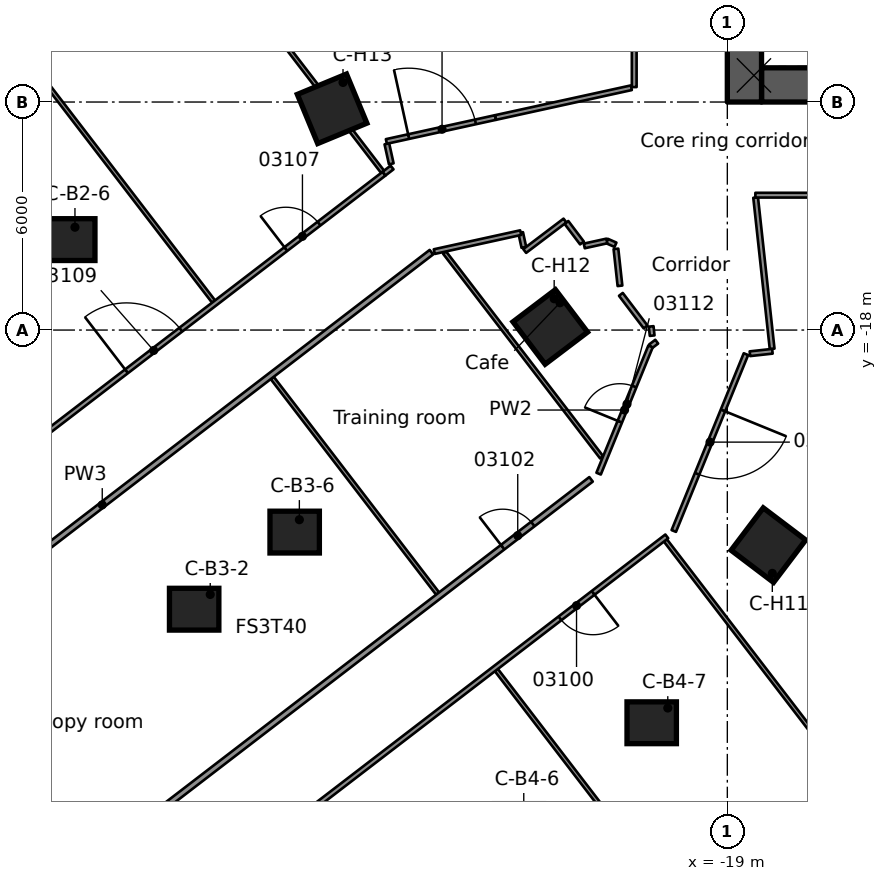
"""IFC4 building model, lengths in metres.
Left out: names, types, materials, properties, quantities, classifications, styles, units other than length and angle.
Written with IfcOpenShell. Run it as: python <this file> out.ifc"""

import sys

from ifc_helpers import new_model, si_unit, direction, frame, frame_2d, origin, origin_2d, place, context, subcontext, project, spatial, rectangle, extrude, element, fill, save


model = new_model("IFC4")
c1 = context("Model", 3, precision=1e-05, world=origin(), true_north=direction((0.0, 1.0)))
c2 = subcontext(c1, "Body", "Model", "MODEL_VIEW")
j1 = project(units=[si_unit("LENGTHUNIT", "METRE"), si_unit("PLANEANGLEUNIT", "RADIAN")], contexts=[c1])
p1 = place(None, origin())
s1 = spatial("IfcSite", under=j1, at=p1, CompositionType="ELEMENT")
p2 = place(p1, origin())
s2 = spatial("IfcBuilding", under=s1, at=p2, CompositionType="ELEMENT")
p3 = place(p2, frame((0.0, 0.0, 15.5)))
s3 = spatial("IfcBuildingStorey", under=s2, at=p3, CompositionType="ELEMENT", Elevation=15.5)
p4 = place(p3, frame((-18.1, -11.55, 0.0), z_axis=(0.0, 0.0, 1.0), x_axis=(1.0, 0.0, 0.0)))
e1 = element("IfcWall", 1, at=p4, inside=s3, PredefinedType="SHEAR", context=c2, shape_type="SweptSolid", body=[
    extrude(rectangle(XDim=9.2, YDim=0.9, at=frame_2d((4.6, 0.0))), origin(), (0.0, 0.0, 1.0), 5.0),
])
p5 = place(p4, frame((5.1, 0.0, 0.0)))
e2 = element("IfcOpeningElement", 2, at=p5, cuts=e1, PredefinedType="OPENING", context=c2, shape_type="SweptSolid", body=[
    extrude(rectangle(XDim=1.1, YDim=2.1, at=frame_2d((0.55, 1.05))), frame((0.0, 0.46, 0.0), z_axis=(0.0, -1.0, 0.0), x_axis=(1.0, 0.0, 0.0)), (0.0, 0.0, 1.0), 0.92),
])
p6 = place(p4, frame((7.53, 0.0, 0.0)))
e3 = element("IfcOpeningElement", 3, at=p6, cuts=e1, PredefinedType="OPENING", context=c2, shape_type="SweptSolid", body=[
    extrude(rectangle(XDim=0.9, YDim=2.1, at=frame_2d((0.45, 1.05))), frame((0.0, 0.46, 0.0), z_axis=(0.0, -1.0, 0.0), x_axis=(1.0, 0.0, 0.0)), (0.0, 0.0, 1.0), 0.92),
])
p7 = place(p3, frame((-18.55, -12.0, 0.0), z_axis=(0.0, 0.0, 1.0), x_axis=(0.0, 1.0, 0.0)))
e4 = element("IfcWall", 4, at=p7, inside=s3, PredefinedType="SHEAR", context=c2, shape_type="SweptSolid", body=[
    extrude(rectangle(XDim=24.0, YDim=0.9, at=frame_2d((12.0, 0.0))), origin(), (0.0, 0.0, 1.0), 5.0),
])
p8 = place(p7, frame((10.1, 0.0, 0.0)))
e5 = element("IfcOpeningElement", 5, at=p8, cuts=e4, PredefinedType="OPENING", context=c2, shape_type="SweptSolid", body=[
    extrude(rectangle(XDim=1.8, YDim=2.1, at=frame_2d((0.9, 1.05))), frame((0.0, 0.46, 0.0), z_axis=(0.0, -1.0, 0.0), x_axis=(1.0, 0.0, 0.0)), (0.0, 0.0, 1.0), 0.92),
])
for number, where, z_axis, x_axis in (
    (6, (-36.29, -15.62, 0.0), (0.0, 0.0, 1.0), (1.0, 0.0, 0.0)),
    (7, (-33.03, -25.345, 0.0), (0.0, 0.0, 1.0), (1.0, 0.0, 0.0)),
    (8, (-30.385, -23.316, 0.0), (0.0, 0.0, 1.0), (1.0, 0.0, 0.0)),
    (9, (-20.99, -28.333, 0.0), (0.0, 0.0, 1.0), (1.0, 0.0, 0.0)),
):
    element("IfcColumn", number, at=place(p3, frame(where, z_axis=z_axis, x_axis=x_axis)), inside=s3, PredefinedType="COLUMN", context=c2, shape_type="SweptSolid", body=[
        extrude(rectangle(XDim=1.3, YDim=1.1, at=origin_2d()), origin(), (0.0, 0.0, 1.0), 5.0),
    ])
for number, where, z_axis, x_axis in (
    (10, (-17.919, -23.659, 0.0), (0.0, 0.0, 1.0), (-0.604, -0.797, 0.0)),
    (11, (-23.659, -17.919, 0.0), (0.0, 0.0, 1.0), (-0.797, -0.604, 0.0)),
    (12, (-29.4, -12.178, 0.0), (0.0, 0.0, 1.0), (-0.924, -0.383, 0.0)),
):
    element("IfcColumn", number, at=place(p3, frame(where, z_axis=z_axis, x_axis=x_axis)), inside=s3, PredefinedType="COLUMN", context=c2, shape_type="SweptSolid", body=[
        extrude(rectangle(XDim=1.4, YDim=1.4, at=origin_2d()), origin(), (0.0, 0.0, 1.0), 5.0),
    ])
p9 = place(p3, frame((-21.004, -17.904, 0.0), z_axis=(0.0, 0.0, 1.0), x_axis=(0.105933230141, -0.994373245191, 0.0)))
e13 = element("IfcWall", 13, at=p9, inside=s3, PredefinedType="PARTITIONING", context=c2, shape_type="SweptSolid", body=[
    extrude(rectangle(XDim=0.244, YDim=0.125, at=frame_2d((0.122, 0.0))), origin(), (0.0, 0.0, 1.0), 4.58),
])
p10 = place(p3, frame((-21.931, -15.864, 0.0), z_axis=(0.0, 0.0, 1.0), x_axis=(0.10837572028, -0.99411000561, 0.0)))
e14 = element("IfcWall", 14, at=p10, inside=s3, PredefinedType="PARTITIONING", context=c2, shape_type="SweptSolid", body=[
    extrude(rectangle(XDim=0.978, YDim=0.125, at=frame_2d((0.489, 0.0))), origin(), (0.0, 0.0, 1.0), 4.58),
])
p11 = place(p3, frame((-18.255, -14.513, 0.0), z_axis=(0.0, 0.0, 1.0), x_axis=(0.108304050005, -0.994117816334, 0.0)))
e15 = element("IfcWall", 15, at=p11, inside=s3, PredefinedType="PARTITIONING", context=c2, shape_type="SweptSolid", body=[
    extrude(rectangle(XDim=4.006, YDim=0.125, at=frame_2d((2.003, 0.0))), origin(), (0.0, 0.0, 1.0), 4.58),
])
p12 = place(p3, frame((-24.438, -15.437, 0.0), z_axis=(0.0, 0.0, 1.0), x_axis=(0.212096867325, -0.977248647413, 0.0)))
e16 = element("IfcWall", 16, at=p12, inside=s3, PredefinedType="PARTITIONING", context=c2, shape_type="SweptSolid", body=[
    extrude(rectangle(XDim=0.396, YDim=0.125, at=frame_2d((0.198, 0.0))), origin(), (0.0, 0.0, 1.0), 4.58),
])
p13 = place(p3, frame((-27.959, -13.1, 0.0), z_axis=(0.0, 0.0, 1.0), x_axis=(0.215346078447, -0.976537795734, 0.0)))
e17 = element("IfcWall", 17, at=p13, inside=s3, PredefinedType="PARTITIONING", context=c2, shape_type="SweptSolid", body=[
    extrude(rectangle(XDim=0.539, YDim=0.125, at=frame_2d((0.269, 0.0))), origin(), (0.0, 0.0, 1.0), 4.58),
])
p14 = place(p3, frame((-23.234, -15.168, 0.0), z_axis=(0.0, 0.0, 1.0), x_axis=(0.602990949897, -0.797748026849, 0.0)))
e18 = element("IfcWall", 18, at=p14, inside=s3, PredefinedType="PARTITIONING", context=c2, shape_type="SweptSolid", body=[
    extrude(rectangle(XDim=0.678, YDim=0.125, at=frame_2d((0.339, 0.0))), origin(), (0.0, 0.0, 1.0), 4.58),
])
p15 = place(p3, frame((-21.801, -17.061, 0.0), z_axis=(0.0, 0.0, 1.0), x_axis=(0.604123687543, -0.796890563471, 0.0)))
e19 = element("IfcWall", 19, at=p15, inside=s3, PredefinedType="PARTITIONING", context=c2, shape_type="SweptSolid", body=[
    extrude(rectangle(XDim=1.078, YDim=0.125, at=frame_2d((0.539, 0.0))), origin(), (0.0, 0.0, 1.0), 4.58),
])
p16 = place(p3, frame((-41.126, -6.033, 0.0), z_axis=(0.0, 0.0, 1.0), x_axis=(0.608775561638, -0.793342495743, 0.0)))
e20 = element("IfcWall", 20, at=p16, inside=s3, PredefinedType="PARTITIONING", context=c2, shape_type="SweptSolid", body=[
    extrude(rectangle(XDim=14.136, YDim=0.1, at=frame_2d((7.068, 0.0))), origin(), (0.0, 0.0, 1.0), 4.58),
])
p17 = place(p3, frame((-30.975, -19.261, 0.0), z_axis=(0.0, 0.0, 1.0), x_axis=(0.608667353297, -0.793425518263, 0.0)))
e21 = element("IfcWall", 21, at=p17, inside=s3, PredefinedType="PARTITIONING", context=c2, shape_type="SweptSolid", body=[
    extrude(rectangle(XDim=7.15, YDim=0.1, at=frame_2d((3.575, 0.0))), origin(), (0.0, 0.0, 1.0), 4.58),
])
p18 = place(p3, frame((-25.077, -26.948, 0.0), z_axis=(0.0, 0.0, 1.0), x_axis=(0.60874219909, -0.793368095557, 0.0)))
e22 = element("IfcWall", 22, at=p18, inside=s3, PredefinedType="PARTITIONING", context=c2, shape_type="SweptSolid", body=[
    extrude(rectangle(XDim=14.137, YDim=0.1, at=frame_2d((7.069, 0.0))), origin(), (0.0, 0.0, 1.0), 4.58),
])
p19 = place(p3, frame((-36.678, -2.62, 0.0), z_axis=(0.0, 0.0, 1.0), x_axis=(0.608783902678, -0.793336095132, 0.0)))
e23 = element("IfcWall", 23, at=p19, inside=s3, PredefinedType="PARTITIONING", context=c2, shape_type="SweptSolid", body=[
    extrude(rectangle(XDim=14.136, YDim=0.1, at=frame_2d((7.068, 0.0))), origin(), (0.0, 0.0, 1.0), 4.58),
])
p20 = place(p3, frame((-26.44, -15.962, 0.0), z_axis=(0.0, 0.0, 1.0), x_axis=(0.608697215762, -0.79340260872, 0.0)))
e24 = element("IfcWall", 24, at=p20, inside=s3, PredefinedType="PARTITIONING", context=c2, shape_type="SweptSolid", body=[
    extrude(rectangle(XDim=6.79, YDim=0.1, at=frame_2d((3.395, 0.0))), origin(), (0.0, 0.0, 1.0), 4.58),
])
p21 = place(p3, frame((-20.63, -23.535, 0.0), z_axis=(0.0, 0.0, 1.0), x_axis=(0.608785675767, -0.79333473451, 0.0)))
e25 = element("IfcWall", 25, at=p21, inside=s3, PredefinedType="PARTITIONING", context=c2, shape_type="SweptSolid", body=[
    extrude(rectangle(XDim=14.138, YDim=0.1, at=frame_2d((7.069, 0.0))), origin(), (0.0, 0.0, 1.0), 4.58),
])
p22 = place(p3, frame((-22.17, -15.656, 0.0), z_axis=(0.0, 0.0, 1.0), x_axis=(0.914864311429, -0.403761429156, 0.0)))
e26 = element("IfcWall", 26, at=p22, inside=s3, PredefinedType="PARTITIONING", context=c2, shape_type="SweptSolid", body=[
    extrude(rectangle(XDim=0.248, YDim=0.125, at=frame_2d((0.124, 0.0))), origin(), (0.0, 0.0, 1.0), 4.58),
])
p23 = place(p3, frame((-10.391, -14.451, 0.0), z_axis=(0.0, 0.0, 1.0), x_axis=(-1.0, 0.0, 0.0)))
e27 = element("IfcWall", 27, at=p23, inside=s3, PredefinedType="PARTITIONING", context=c2, shape_type="SweptSolid", body=[
    extrude(rectangle(XDim=7.871, YDim=0.125, at=frame_2d((3.936, 0.0))), origin(), (0.0, 0.0, 1.0), 4.58),
])
p24 = place(p23, frame((3.1, 0.0, 0.0)))
e28 = element("IfcOpeningElement", 28, at=p24, cuts=e27, PredefinedType="OPENING", context=c2, shape_type="SweptSolid", body=[
    extrude(rectangle(XDim=1.8, YDim=2.1, at=frame_2d((0.9, 1.05))), frame((0.0, 0.073, 0.0), z_axis=(0.0, -1.0, 0.0), x_axis=(1.0, 0.0, 0.0)), (0.0, 0.0, 1.0), 0.145),
])
p25 = place(p3, frame((-18.406, -18.623, 0.0), z_axis=(0.0, 0.0, 1.0), x_axis=(0.994037722998, 0.109036715182, 0.0)))
e29 = element("IfcWall", 29, at=p25, inside=s3, PredefinedType="PARTITIONING", context=c2, shape_type="SweptSolid", body=[
    extrude(rectangle(XDim=0.596, YDim=0.125, at=frame_2d((0.298, 0.0))), origin(), (0.0, 0.0, 1.0), 4.58),
])
p26 = place(p3, frame((-26.712, -15.936, 0.0), z_axis=(0.0, 0.0, 1.0), x_axis=(0.976756126143, 0.214353609817, 0.0)))
e30 = element("IfcWall", 30, at=p26, inside=s3, PredefinedType="PARTITIONING", context=c2, shape_type="SweptSolid", body=[
    extrude(rectangle(XDim=2.328, YDim=0.125, at=frame_2d((1.164, 0.0))), origin(), (0.0, 0.0, 1.0), 4.58),
])
p27 = place(p3, frame((-22.765, -15.787, 0.0), z_axis=(0.0, 0.0, 1.0), x_axis=(0.97657209397, 0.215190486033, 0.0)))
e31 = element("IfcWall", 31, at=p27, inside=s3, PredefinedType="PARTITIONING", context=c2, shape_type="SweptSolid", body=[
    extrude(rectangle(XDim=0.609, YDim=0.125, at=frame_2d((0.305, 0.0))), origin(), (0.0, 0.0, 1.0), 4.58),
])
p28 = place(p3, frame((-25.102, -12.408, 0.0), z_axis=(0.0, 0.0, 1.0), x_axis=(0.976805954505, 0.214126428176, 0.0)))
e32 = element("IfcWall", 32, at=p28, inside=s3, PredefinedType="PARTITIONING", context=c2, shape_type="SweptSolid", body=[
    extrude(rectangle(XDim=3.661, YDim=0.125, at=frame_2d((1.831, 0.0))), origin(), (0.0, 0.0, 1.0), 4.58),
])
p29 = place(p3, frame((-27.972, -13.038, 0.0), z_axis=(0.0, 0.0, 1.0), x_axis=(0.976718013582, 0.214527205604, 0.0)))
e33 = element("IfcWall", 33, at=p29, inside=s3, PredefinedType="PARTITIONING", context=c2, shape_type="SweptSolid", body=[
    extrude(rectangle(XDim=2.937, YDim=0.125, at=frame_2d((1.469, 0.0))), origin(), (0.0, 0.0, 1.0), 4.58),
])
p30 = place(p29, frame((0.6, 0.0, 0.0)))
e34 = element("IfcOpeningElement", 34, at=p30, cuts=e33, PredefinedType="OPENING", context=c2, shape_type="SweptSolid", body=[
    extrude(rectangle(XDim=1.8, YDim=2.1, at=frame_2d((0.9, 1.05))), frame((0.0, 0.073, 0.0), z_axis=(0.0, -1.0, 0.0), x_axis=(1.0, 0.0, 0.0)), (0.0, 0.0, 1.0), 0.145),
])
p31 = place(p3, frame((-24.332, -15.92, 0.0), z_axis=(0.0, 0.0, 1.0), x_axis=(0.797480426333, 0.603344818172, 0.0)))
e35 = element("IfcWall", 35, at=p31, inside=s3, PredefinedType="PARTITIONING", context=c2, shape_type="SweptSolid", body=[
    extrude(rectangle(XDim=1.329, YDim=0.125, at=frame_2d((0.665, 0.0))), origin(), (0.0, 0.0, 1.0), 4.58),
])
p32 = place(p3, frame((-21.019, -18.428, 0.0), z_axis=(0.0, 0.0, 1.0), x_axis=(0.797092148154, 0.603857687995, 0.0)))
e36 = element("IfcWall", 36, at=p32, inside=s3, PredefinedType="PARTITIONING", context=c2, shape_type="SweptSolid", body=[
    extrude(rectangle(XDim=0.202, YDim=0.125, at=frame_2d((0.101, 0.0))), origin(), (0.0, 0.0, 1.0), 4.58),
])
p33 = place(p3, frame((-20.593, -23.429, 0.0), z_axis=(0.0, 0.0, 1.0), x_axis=(-0.793381896857, -0.60872421156, 0.0)))
e37 = element("IfcWall", 37, at=p33, inside=s3, PredefinedType="PARTITIONING", context=c2, shape_type="SweptSolid", body=[
    extrude(rectangle(XDim=24.9, YDim=0.125, at=frame_2d((12.45, 0.0))), origin(), (0.0, 0.0, 1.0), 4.58),
])
p34 = place(p33, frame((2.444, 0.0, 0.0)))
e38 = element("IfcOpeningElement", 38, at=p34, cuts=e37, PredefinedType="OPENING", context=c2, shape_type="SweptSolid", body=[
    extrude(rectangle(XDim=1.1, YDim=2.1, at=frame_2d((0.55, 1.05))), frame((0.0, 0.073, 0.0), z_axis=(0.0, -1.0, 0.0), x_axis=(1.0, 0.0, 0.0)), (0.0, 0.0, 1.0), 0.145),
])
p35 = place(p33, frame((13.835, 0.0, 0.0)))
e39 = element("IfcOpeningElement", 39, at=p35, cuts=e37, PredefinedType="OPENING", context=c2, shape_type="SweptSolid", body=[
    extrude(rectangle(XDim=1.8, YDim=2.1, at=frame_2d((0.9, 1.05))), frame((0.0, 0.073, 0.0), z_axis=(0.0, -1.0, 0.0), x_axis=(1.0, 0.0, 0.0)), (0.0, 0.0, 1.0), 0.145),
])
p36 = place(p3, frame((-39.667, -35.038, 0.0), z_axis=(0.0, 0.0, 1.0), x_axis=(0.793278123289, 0.608859441177, 0.0)))
e40 = element("IfcWall", 40, at=p36, inside=s3, PredefinedType="PARTITIONING", context=c2, shape_type="SweptSolid", body=[
    extrude(rectangle(XDim=21.532, YDim=0.15, at=frame_2d((10.766, 0.0))), origin(), (0.0, 0.0, 1.0), 4.58),
])
p37 = place(p36, frame((18.6, 0.0, 0.0)))
e41 = element("IfcOpeningElement", 41, at=p37, cuts=e40, PredefinedType="OPENING", context=c2, shape_type="SweptSolid", body=[
    extrude(rectangle(XDim=1.0, YDim=2.1, at=frame_2d((0.5, 1.05))), frame((0.0, 0.085, 0.0), z_axis=(0.0, -1.0, 0.0), x_axis=(1.0, 0.0, 0.0)), (0.0, 0.0, 1.0), 0.17),
])
p38 = place(p36, frame((0.85, 0.0, 0.0)))
e42 = element("IfcOpeningElement", 42, at=p38, cuts=e40, PredefinedType="OPENING", context=c2, shape_type="SweptSolid", body=[
    extrude(rectangle(XDim=0.9, YDim=2.1, at=frame_2d((0.45, 1.05))), frame((0.0, 0.085, 0.0), z_axis=(0.0, -1.0, 0.0), x_axis=(1.0, 0.0, 0.0)), (0.0, 0.0, 1.0), 0.17),
])
p39 = place(p3, frame((-26.787, -15.951, 0.0), z_axis=(0.0, 0.0, 1.0), x_axis=(-0.793270647626, -0.608869181035, 0.0)))
e43 = element("IfcWall", 43, at=p39, inside=s3, PredefinedType="PARTITIONING", context=c2, shape_type="SweptSolid", body=[
    extrude(rectangle(XDim=21.837, YDim=0.15, at=frame_2d((10.919, 0.0))), origin(), (0.0, 0.0, 1.0), 4.58),
])
p40 = place(p39, frame((13.973, 0.0, 0.0)))
e44 = element("IfcOpeningElement", 44, at=p40, cuts=e43, PredefinedType="OPENING", context=c2, shape_type="SweptSolid", body=[
    extrude(rectangle(XDim=0.9, YDim=2.1, at=frame_2d((0.45, 1.05))), frame((0.0, 0.085, 0.0), z_axis=(0.0, -1.0, 0.0), x_axis=(1.0, 0.0, 0.0)), (0.0, 0.0, 1.0), 0.17),
])
p41 = place(p3, frame((-47.476, -28.803, 0.0), z_axis=(0.0, 0.0, 1.0), x_axis=(0.793397382488, 0.608704027801, 0.0)))
e45 = element("IfcWall", 45, at=p41, inside=s3, PredefinedType="PARTITIONING", context=c2, shape_type="SweptSolid", body=[
    extrude(rectangle(XDim=24.506, YDim=0.125, at=frame_2d((12.253, 0.0))), origin(), (0.0, 0.0, 1.0), 4.58),
])
p42 = place(p41, frame((21.249, 0.0, 0.0)))
e46 = element("IfcOpeningElement", 46, at=p42, cuts=e45, PredefinedType="OPENING", context=c2, shape_type="SweptSolid", body=[
    extrude(rectangle(XDim=1.1, YDim=2.1, at=frame_2d((0.55, 1.05))), frame((0.0, 0.073, 0.0), z_axis=(0.0, -1.0, 0.0), x_axis=(1.0, 0.0, 0.0)), (0.0, 0.0, 1.0), 0.145),
])
p43 = place(p41, frame((8.75, 0.0, 0.0)))
e47 = element("IfcOpeningElement", 47, at=p43, cuts=e45, PredefinedType="OPENING", context=c2, shape_type="SweptSolid", body=[
    extrude(rectangle(XDim=1.8, YDim=2.1, at=frame_2d((0.9, 1.05))), frame((0.0, 0.073, 0.0), z_axis=(0.0, -1.0, 0.0), x_axis=(1.0, 0.0, 0.0)), (0.0, 0.0, 1.0), 0.145),
])
p44 = place(p41, frame((15.965, 0.0, 0.0)))
e48 = element("IfcOpeningElement", 48, at=p44, cuts=e45, PredefinedType="OPENING", context=c2, shape_type="SweptSolid", body=[
    extrude(rectangle(XDim=1.8, YDim=2.1, at=frame_2d((0.9, 1.05))), frame((0.0, 0.073, 0.0), z_axis=(0.0, -1.0, 0.0), x_axis=(1.0, 0.0, 0.0)), (0.0, 0.0, 1.0), 0.145),
])
p45 = place(p3, frame((-28.034, -13.885, 0.0), z_axis=(0.0, 0.0, 1.0), x_axis=(0.792488206653, 0.609887237378, 0.0)))
e49 = element("IfcWall", 49, at=p45, inside=s3, PredefinedType="PARTITIONING", context=c2, shape_type="SweptSolid", body=[
    extrude(rectangle(XDim=0.267, YDim=0.125, at=frame_2d((0.134, 0.0))), origin(), (0.0, 0.0, 1.0), 4.58),
])
p46 = place(p3, frame((-18.51, -18.634, 0.0), z_axis=(0.0, 0.0, 1.0), x_axis=(-0.377847706778, -0.925867760797, 0.0)))
e50 = element("IfcWall", 50, at=p46, inside=s3, PredefinedType="PARTITIONING", context=c2, shape_type="SweptSolid", body=[
    extrude(rectangle(XDim=5.026, YDim=0.125, at=frame_2d((2.513, 0.0))), origin(), (0.0, 0.0, 1.0), 4.58),
])
p47 = place(p46, frame((1.6, 0.0, 0.0)))
e51 = element("IfcOpeningElement", 51, at=p47, cuts=e50, PredefinedType="OPENING", context=c2, shape_type="SweptSolid", body=[
    extrude(rectangle(XDim=1.8, YDim=2.1, at=frame_2d((0.9, 1.05))), frame((0.0, 0.073, 0.0), z_axis=(0.0, -1.0, 0.0), x_axis=(1.0, 0.0, 0.0)), (0.0, 0.0, 1.0), 0.145),
])
p48 = place(p3, frame((-22.387, -21.778, 0.0), z_axis=(0.0, 0.0, 1.0), x_axis=(0.377843834017, 0.925869341265, 0.0)))
e52 = element("IfcWall", 52, at=p48, inside=s3, PredefinedType="PARTITIONING", context=c2, shape_type="SweptSolid", body=[
    extrude(rectangle(XDim=3.615, YDim=0.125, at=frame_2d((1.808, 0.0))), origin(), (0.0, 0.0, 1.0), 4.58),
])
p49 = place(p48, frame((1.476, 0.0, 0.0)))
e53 = element("IfcOpeningElement", 53, at=p49, cuts=e52, PredefinedType="OPENING", context=c2, shape_type="SweptSolid", body=[
    extrude(rectangle(XDim=1.0, YDim=2.1, at=frame_2d((0.5, 1.05))), frame((0.0, 0.073, 0.0), z_axis=(0.0, -1.0, 0.0), x_axis=(1.0, 0.0, 0.0)), (0.0, 0.0, 1.0), 0.145),
])
p50 = place(p3, frame((-21.45, -11.607, 0.0), z_axis=(0.0, 0.0, 1.0), x_axis=(0.0, 1.0, 0.0)))
e54 = element("IfcWall", 54, at=p50, inside=s3, PredefinedType="PARTITIONING", context=c2, shape_type="SweptSolid", body=[
    extrude(rectangle(XDim=26.058, YDim=0.125, at=frame_2d((13.029, 0.0))), origin(), (0.0, 0.0, 1.0), 4.58),
])
p51 = place(p50, frame((2.6, 0.0, 0.0)))
e55 = element("IfcOpeningElement", 55, at=p51, cuts=e54, PredefinedType="OPENING", context=c2, shape_type="SweptSolid", body=[
    extrude(rectangle(XDim=1.8, YDim=2.1, at=frame_2d((0.9, 1.05))), frame((0.0, 0.073, 0.0), z_axis=(0.0, -1.0, 0.0), x_axis=(1.0, 0.0, 0.0)), (0.0, 0.0, 1.0), 0.145),
])
p52 = place(p50, frame((22.391, 0.0, 0.0)))
e56 = element("IfcOpeningElement", 56, at=p52, cuts=e54, PredefinedType="OPENING", context=c2, shape_type="SweptSolid", body=[
    extrude(rectangle(XDim=0.9, YDim=2.1, at=frame_2d((0.45, 1.05))), frame((0.0, 0.073, 0.0), z_axis=(0.0, -1.0, 0.0), x_axis=(1.0, 0.0, 0.0)), (0.0, 0.0, 1.0), 0.145),
])
p53 = place(p50, frame((15.877, 0.0, 0.0)))
e57 = element("IfcOpeningElement", 57, at=p53, cuts=e54, PredefinedType="OPENING", context=c2, shape_type="SweptSolid", body=[
    extrude(rectangle(XDim=1.0, YDim=2.1, at=frame_2d((0.5, 1.05))), frame((0.0, 0.073, 0.0), z_axis=(0.0, -1.0, 0.0), x_axis=(1.0, 0.0, 0.0)), (0.0, 0.0, 1.0), 0.145),
])
p54 = place(p50, frame((9.378, 0.0, 0.0)))
e58 = element("IfcOpeningElement", 58, at=p54, cuts=e54, PredefinedType="OPENING", context=c2, shape_type="SweptSolid", body=[
    extrude(rectangle(XDim=1.1, YDim=2.1, at=frame_2d((0.55, 1.05))), frame((0.0, 0.073, 0.0), z_axis=(0.0, -1.0, 0.0), x_axis=(1.0, 0.0, 0.0)), (0.0, 0.0, 1.0), 0.145),
])
p55 = place(p34, origin())
e59 = element("IfcDoor", 59, at=p55, inside=s3, OperationType="SINGLE_SWING_LEFT", PredefinedType="DOOR", context=c2, shape_type="SweptSolid", body=[
    extrude(rectangle(XDim=1.1, YDim=2.1, at=frame_2d((0.55, 1.05))), frame((0.0, 0.025, 0.0), z_axis=(0.0, -1.0, 0.0), x_axis=(1.0, 0.0, 0.0)), (0.0, 0.0, 1.0), 0.05),
])
fill(e38, e59)
p56 = place(p37, origin())
e60 = element("IfcDoor", 60, at=p56, inside=s3, OperationType="SINGLE_SWING_RIGHT", PredefinedType="DOOR", context=c2, shape_type="SweptSolid", body=[
    extrude(rectangle(XDim=1.0, YDim=2.1, at=frame_2d((0.5, 1.05))), frame((0.0, 0.025, 0.0), z_axis=(0.0, -1.0, 0.0), x_axis=(1.0, 0.0, 0.0)), (0.0, 0.0, 1.0), 0.05),
])
fill(e41, e60)
p57 = place(p42, origin())
e61 = element("IfcDoor", 61, at=p57, inside=s3, OperationType="SINGLE_SWING_RIGHT", PredefinedType="DOOR", context=c2, shape_type="SweptSolid", body=[
    extrude(rectangle(XDim=1.1, YDim=2.1, at=frame_2d((0.55, 1.05))), frame((0.0, 0.025, 0.0), z_axis=(0.0, -1.0, 0.0), x_axis=(1.0, 0.0, 0.0)), (0.0, 0.0, 1.0), 0.05),
])
fill(e46, e61)
p58 = place(p44, origin())
e62 = element("IfcDoor", 62, at=p58, inside=s3, OperationType="DOUBLE_DOOR_SINGLE_SWING", PredefinedType="DOOR", context=c2, shape_type="SweptSolid", body=[
    extrude(rectangle(XDim=1.8, YDim=2.1, at=frame_2d((0.9, 1.05))), frame((0.0, 0.025, 0.0), z_axis=(0.0, -1.0, 0.0), x_axis=(1.0, 0.0, 0.0)), (0.0, 0.0, 1.0), 0.05),
])
fill(e48, e62)
p59 = place(p30, origin())
e63 = element("IfcDoor", 63, at=p59, inside=s3, OperationType="DOUBLE_DOOR_SINGLE_SWING", PredefinedType="DOOR", context=c2, shape_type="SweptSolid", body=[
    extrude(rectangle(XDim=1.8, YDim=2.1, at=frame_2d((0.9, 1.05))), frame((0.0, 0.025, 0.0), z_axis=(0.0, -1.0, 0.0), x_axis=(1.0, 0.0, 0.0)), (0.0, 0.0, 1.0), 0.05),
])
fill(e34, e63)
p60 = place(p49, origin())
e64 = element("IfcDoor", 64, at=p60, inside=s3, OperationType="SINGLE_SWING_RIGHT", PredefinedType="DOOR", context=c2, shape_type="SweptSolid", body=[
    extrude(rectangle(XDim=1.0, YDim=2.1, at=frame_2d((0.5, 1.05))), frame((0.0, 0.025, 0.0), z_axis=(0.0, -1.0, 0.0), x_axis=(1.0, 0.0, 0.0)), (0.0, 0.0, 1.0), 0.05),
])
fill(e53, e64)
p61 = place(p47, origin())
e65 = element("IfcDoor", 65, at=p61, inside=s3, OperationType="DOUBLE_DOOR_SINGLE_SWING", PredefinedType="DOOR", context=c2, shape_type="SweptSolid", body=[
    extrude(rectangle(XDim=1.8, YDim=2.1, at=frame_2d((0.9, 1.05))), frame((0.0, 0.025, 0.0), z_axis=(0.0, -1.0, 0.0), x_axis=(1.0, 0.0, 0.0)), (0.0, 0.0, 1.0), 0.05),
])
fill(e51, e65)
save(model, sys.argv[1])
